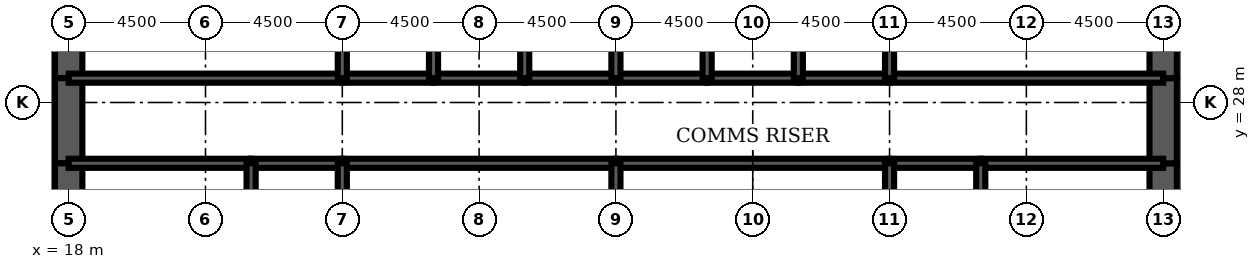
"""IFC4 building model, lengths in metres.
Left out: names, types, materials, properties, quantities, classifications, styles, units other than length and angle.
Written with IfcOpenShell. Run it as: python <this file> out.ifc"""

import sys

from ifc_helpers import new_model, si_unit, direction, frame, frame_2d, origin, place, context, subcontext, project, spatial, rectangle, extrude, element, fill, save


model = new_model("IFC4")
c1 = context("Model", 3, precision=1e-05, world=origin(), true_north=direction((0.0, 1.0)))
c2 = subcontext(c1, "Body", "Model", "MODEL_VIEW")
j1 = project(units=[si_unit("LENGTHUNIT", "METRE"), si_unit("PLANEANGLEUNIT", "RADIAN")], contexts=[c1])
p1 = place(None, origin())
s1 = spatial("IfcSite", under=j1, at=p1, CompositionType="ELEMENT")
p2 = place(p1, origin())
s2 = spatial("IfcBuilding", under=s1, at=p2, CompositionType="ELEMENT")
p3 = place(p2, frame((0.0, 0.0, 163.5)))
s3 = spatial("IfcBuildingStorey", under=s2, at=p3, CompositionType="ELEMENT", Elevation=163.5)
p4 = place(p3, frame((18.0, 32.0, 0.0), z_axis=(0.0, 0.0, 1.0), x_axis=(0.0, -1.0, 0.0)))
e1 = element("IfcWall", 1, at=p4, inside=s3, PredefinedType="SHEAR", context=c2, shape_type="SweptSolid", body=[
    extrude(rectangle(XDim=3.2, YDim=0.9, at=frame_2d((1.6, 0.0))), origin(), (0.0, 0.0, 1.0), 4.2),
])
p5 = place(p3, frame((18.0, 28.8, 0.0), z_axis=(0.0, 0.0, 1.0), x_axis=(0.0, -1.0, 0.0)))
e2 = element("IfcWall", 2, at=p5, inside=s3, PredefinedType="SHEAR", context=c2, shape_type="SweptSolid", body=[
    extrude(rectangle(XDim=2.8, YDim=0.9, at=frame_2d((1.4, 0.0))), origin(), (0.0, 0.0, 1.0), 4.2),
])
p6 = place(p5, frame((0.4, 0.0, 0.0)))
e3 = element("IfcOpeningElement", 3, at=p6, cuts=e2, PredefinedType="OPENING", context=c2, shape_type="SweptSolid", body=[
    extrude(rectangle(XDim=1.8, YDim=2.1, at=frame_2d((0.9, 1.05))), frame((0.0, 0.46, 0.0), z_axis=(0.0, -1.0, 0.0), x_axis=(1.0, 0.0, 0.0)), (0.0, 0.0, 1.0), 0.92),
])
for number, where, z_axis, x_axis in (
    (4, (18.0, 26.0, 0.0), (0.0, 0.0, 1.0), (0.0, -1.0, 0.0)),
    (5, (54.0, 22.0, 0.0), (0.0, 0.0, 1.0), (0.0, 1.0, 0.0)),
):
    element("IfcWall", number, at=place(p3, frame(where, z_axis=z_axis, x_axis=x_axis)), inside=s3, PredefinedType="SHEAR", context=c2, shape_type="SweptSolid", body=[
        extrude(rectangle(XDim=4.0, YDim=0.9, at=frame_2d((2.0, 0.0))), origin(), (0.0, 0.0, 1.0), 4.2),
    ])
p7 = place(p3, frame((54.0, 26.0, 0.0), z_axis=(0.0, 0.0, 1.0), x_axis=(0.0, 1.0, 0.0)))
e6 = element("IfcWall", 6, at=p7, inside=s3, PredefinedType="SHEAR", context=c2, shape_type="SweptSolid", body=[
    extrude(rectangle(XDim=2.8, YDim=0.9, at=frame_2d((1.4, 0.0))), origin(), (0.0, 0.0, 1.0), 4.2),
])
p8 = place(p7, frame((0.6, 0.0, 0.0)))
e7 = element("IfcOpeningElement", 7, at=p8, cuts=e6, PredefinedType="OPENING", context=c2, shape_type="SweptSolid", body=[
    extrude(rectangle(XDim=1.8, YDim=2.1, at=frame_2d((0.9, 1.05))), frame((0.0, 0.46, 0.0), z_axis=(0.0, -1.0, 0.0), x_axis=(1.0, 0.0, 0.0)), (0.0, 0.0, 1.0), 0.92),
])
p9 = place(p3, frame((54.0, 28.8, 0.0), z_axis=(0.0, 0.0, 1.0), x_axis=(0.0, 1.0, 0.0)))
e8 = element("IfcWall", 8, at=p9, inside=s3, PredefinedType="SHEAR", context=c2, shape_type="SweptSolid", body=[
    extrude(rectangle(XDim=3.2, YDim=0.9, at=frame_2d((1.6, 0.0))), origin(), (0.0, 0.0, 1.0), 4.2),
])
p10 = place(p3, frame((18.0, 28.8, 0.0), z_axis=(0.0, 0.0, 1.0), x_axis=(1.0, 0.0, 0.0)))
e9 = element("IfcWall", 9, at=p10, inside=s3, PredefinedType="SOLIDWALL", context=c2, shape_type="SweptSolid", body=[
    extrude(rectangle(XDim=9.0, YDim=0.3, at=frame_2d((4.5, 0.0))), origin(), (0.0, 0.0, 1.0), 4.2),
])
p11 = place(p10, frame((0.65, 0.0, 0.0)))
e10 = element("IfcOpeningElement", 10, at=p11, cuts=e9, PredefinedType="OPENING", context=c2, shape_type="SweptSolid", body=[
    extrude(rectangle(XDim=1.0, YDim=2.1, at=frame_2d((0.5, 1.05))), frame((0.0, 0.16, 0.0), z_axis=(0.0, -1.0, 0.0), x_axis=(1.0, 0.0, 0.0)), (0.0, 0.0, 1.0), 0.32),
])
p12 = place(p3, frame((27.0, 28.8, 0.0), z_axis=(0.0, 0.0, 1.0), x_axis=(1.0, 0.0, 0.0)))
e11 = element("IfcWall", 11, at=p12, inside=s3, PredefinedType="SOLIDWALL", context=c2, shape_type="SweptSolid", body=[
    extrude(rectangle(XDim=3.0, YDim=0.3, at=frame_2d((1.5, 0.0))), origin(), (0.0, 0.0, 1.0), 4.2),
])
p13 = place(p12, frame((0.95, 0.0, 0.0)))
e12 = element("IfcOpeningElement", 12, at=p13, cuts=e11, PredefinedType="OPENING", context=c2, shape_type="SweptSolid", body=[
    extrude(rectangle(XDim=1.1, YDim=2.2, at=frame_2d((0.55, 1.1))), frame((0.0, 0.16, 0.0), z_axis=(0.0, -1.0, 0.0), x_axis=(1.0, 0.0, 0.0)), (0.0, 0.0, 1.0), 0.32),
])
p14 = place(p3, frame((30.0, 28.8, 0.0), z_axis=(0.0, 0.0, 1.0), x_axis=(1.0, 0.0, 0.0)))
e13 = element("IfcWall", 13, at=p14, inside=s3, PredefinedType="SOLIDWALL", context=c2, shape_type="SweptSolid", body=[
    extrude(rectangle(XDim=3.0, YDim=0.3, at=frame_2d((1.5, 0.0))), origin(), (0.0, 0.0, 1.0), 4.2),
])
p15 = place(p14, frame((0.95, 0.0, 0.0)))
e14 = element("IfcOpeningElement", 14, at=p15, cuts=e13, PredefinedType="OPENING", context=c2, shape_type="SweptSolid", body=[
    extrude(rectangle(XDim=1.1, YDim=2.2, at=frame_2d((0.55, 1.1))), frame((0.0, 0.16, 0.0), z_axis=(0.0, -1.0, 0.0), x_axis=(1.0, 0.0, 0.0)), (0.0, 0.0, 1.0), 0.32),
])
p16 = place(p3, frame((33.0, 28.8, 0.0), z_axis=(0.0, 0.0, 1.0), x_axis=(1.0, 0.0, 0.0)))
e15 = element("IfcWall", 15, at=p16, inside=s3, PredefinedType="SOLIDWALL", context=c2, shape_type="SweptSolid", body=[
    extrude(rectangle(XDim=3.0, YDim=0.3, at=frame_2d((1.5, 0.0))), origin(), (0.0, 0.0, 1.0), 4.2),
])
p17 = place(p16, frame((0.95, 0.0, 0.0)))
e16 = element("IfcOpeningElement", 16, at=p17, cuts=e15, PredefinedType="OPENING", context=c2, shape_type="SweptSolid", body=[
    extrude(rectangle(XDim=1.1, YDim=2.2, at=frame_2d((0.55, 1.1))), frame((0.0, 0.16, 0.0), z_axis=(0.0, -1.0, 0.0), x_axis=(1.0, 0.0, 0.0)), (0.0, 0.0, 1.0), 0.32),
])
for number, where, z_axis, x_axis in (
    (17, (36.0, 28.8, 0.0), (0.0, 0.0, 1.0), (1.0, 0.0, 0.0)),
    (18, (39.0, 28.8, 0.0), (0.0, 0.0, 1.0), (1.0, 0.0, 0.0)),
):
    element("IfcWall", number, at=place(p3, frame(where, z_axis=z_axis, x_axis=x_axis)), inside=s3, PredefinedType="SOLIDWALL", context=c2, shape_type="SweptSolid", body=[
        extrude(rectangle(XDim=3.0, YDim=0.3, at=frame_2d((1.5, 0.0))), origin(), (0.0, 0.0, 1.0), 4.2),
    ])
p18 = place(p3, frame((42.0, 28.8, 0.0), z_axis=(0.0, 0.0, 1.0), x_axis=(1.0, 0.0, 0.0)))
e19 = element("IfcWall", 19, at=p18, inside=s3, PredefinedType="SOLIDWALL", context=c2, shape_type="SweptSolid", body=[
    extrude(rectangle(XDim=3.0, YDim=0.3, at=frame_2d((1.5, 0.0))), origin(), (0.0, 0.0, 1.0), 4.2),
])
p19 = place(p18, frame((0.95, 0.0, 0.0)))
e20 = element("IfcOpeningElement", 20, at=p19, cuts=e19, PredefinedType="OPENING", context=c2, shape_type="SweptSolid", body=[
    extrude(rectangle(XDim=1.1, YDim=2.2, at=frame_2d((0.55, 1.1))), frame((0.0, 0.16, 0.0), z_axis=(0.0, -1.0, 0.0), x_axis=(1.0, 0.0, 0.0)), (0.0, 0.0, 1.0), 0.32),
])
p20 = place(p3, frame((45.0, 28.8, 0.0), z_axis=(0.0, 0.0, 1.0), x_axis=(1.0, 0.0, 0.0)))
e21 = element("IfcWall", 21, at=p20, inside=s3, PredefinedType="SOLIDWALL", context=c2, shape_type="SweptSolid", body=[
    extrude(rectangle(XDim=9.0, YDim=0.3, at=frame_2d((4.5, 0.0))), origin(), (0.0, 0.0, 1.0), 4.2),
])
p21 = place(p20, frame((7.35, 0.0, 0.0)))
e22 = element("IfcOpeningElement", 22, at=p21, cuts=e21, PredefinedType="OPENING", context=c2, shape_type="SweptSolid", body=[
    extrude(rectangle(XDim=1.0, YDim=2.1, at=frame_2d((0.5, 1.05))), frame((0.0, 0.16, 0.0), z_axis=(0.0, -1.0, 0.0), x_axis=(1.0, 0.0, 0.0)), (0.0, 0.0, 1.0), 0.32),
])
p22 = place(p3, frame((18.0, 26.0, 0.0), z_axis=(0.0, 0.0, 1.0), x_axis=(1.0, 0.0, 0.0)))
e23 = element("IfcWall", 23, at=p22, inside=s3, PredefinedType="SOLIDWALL", context=c2, shape_type="SweptSolid", body=[
    extrude(rectangle(XDim=6.0, YDim=0.3, at=frame_2d((3.0, 0.0))), origin(), (0.0, 0.0, 1.0), 4.2),
])
p23 = place(p3, frame((24.0, 26.0, 0.0), z_axis=(0.0, 0.0, 1.0), x_axis=(1.0, 0.0, 0.0)))
e24 = element("IfcWall", 24, at=p23, inside=s3, PredefinedType="SOLIDWALL", context=c2, shape_type="SweptSolid", body=[
    extrude(rectangle(XDim=3.0, YDim=0.3, at=frame_2d((1.5, 0.0))), origin(), (0.0, 0.0, 1.0), 4.2),
])
for number, where, z_axis, x_axis in (
    (25, (27.0, 26.0, 0.0), (0.0, 0.0, 1.0), (1.0, 0.0, 0.0)),
    (26, (36.0, 26.0, 0.0), (0.0, 0.0, 1.0), (1.0, 0.0, 0.0)),
):
    element("IfcWall", number, at=place(p3, frame(where, z_axis=z_axis, x_axis=x_axis)), inside=s3, PredefinedType="SOLIDWALL", context=c2, shape_type="SweptSolid", body=[
        extrude(rectangle(XDim=9.0, YDim=0.3, at=frame_2d((4.5, 0.0))), origin(), (0.0, 0.0, 1.0), 4.2),
    ])
p24 = place(p3, frame((45.0, 26.0, 0.0), z_axis=(0.0, 0.0, 1.0), x_axis=(1.0, 0.0, 0.0)))
e27 = element("IfcWall", 27, at=p24, inside=s3, PredefinedType="SOLIDWALL", context=c2, shape_type="SweptSolid", body=[
    extrude(rectangle(XDim=3.0, YDim=0.3, at=frame_2d((1.5, 0.0))), origin(), (0.0, 0.0, 1.0), 4.2),
])
p25 = place(p3, frame((48.0, 26.0, 0.0), z_axis=(0.0, 0.0, 1.0), x_axis=(1.0, 0.0, 0.0)))
e28 = element("IfcWall", 28, at=p25, inside=s3, PredefinedType="SOLIDWALL", context=c2, shape_type="SweptSolid", body=[
    extrude(rectangle(XDim=6.0, YDim=0.3, at=frame_2d((3.0, 0.0))), origin(), (0.0, 0.0, 1.0), 4.2),
])
for number, where, z_axis, x_axis in (
    (29, (27.0, 28.8, 0.0), (0.0, 0.0, 1.0), (0.0, 1.0, 0.0)),
    (30, (30.0, 28.8, 0.0), (0.0, 0.0, 1.0), (0.0, 1.0, 0.0)),
    (31, (33.0, 28.8, 0.0), (0.0, 0.0, 1.0), (0.0, 1.0, 0.0)),
    (32, (36.0, 28.8, 0.0), (0.0, 0.0, 1.0), (0.0, 1.0, 0.0)),
    (33, (39.0, 28.8, 0.0), (0.0, 0.0, 1.0), (0.0, 1.0, 0.0)),
    (34, (42.0, 28.8, 0.0), (0.0, 0.0, 1.0), (0.0, 1.0, 0.0)),
    (35, (45.0, 28.8, 0.0), (0.0, 0.0, 1.0), (0.0, 1.0, 0.0)),
):
    element("IfcWall", number, at=place(p3, frame(where, z_axis=z_axis, x_axis=x_axis)), inside=s3, PredefinedType="SOLIDWALL", context=c2, shape_type="SweptSolid", body=[
        extrude(rectangle(XDim=3.2, YDim=0.3, at=frame_2d((1.6, 0.0))), origin(), (0.0, 0.0, 1.0), 4.2),
    ])
for number, where, z_axis, x_axis in (
    (36, (24.0, 22.0, 0.0), (0.0, 0.0, 1.0), (0.0, 1.0, 0.0)),
    (37, (27.0, 22.0, 0.0), (0.0, 0.0, 1.0), (0.0, 1.0, 0.0)),
    (38, (36.0, 22.0, 0.0), (0.0, 0.0, 1.0), (0.0, 1.0, 0.0)),
    (39, (45.0, 22.0, 0.0), (0.0, 0.0, 1.0), (0.0, 1.0, 0.0)),
    (40, (48.0, 22.0, 0.0), (0.0, 0.0, 1.0), (0.0, 1.0, 0.0)),
):
    element("IfcWall", number, at=place(p3, frame(where, z_axis=z_axis, x_axis=x_axis)), inside=s3, PredefinedType="SOLIDWALL", context=c2, shape_type="SweptSolid", body=[
        extrude(rectangle(XDim=4.0, YDim=0.3, at=frame_2d((2.0, 0.0))), origin(), (0.0, 0.0, 1.0), 4.2),
    ])
p26 = place(p3, frame((39.0, 22.15, 0.0), z_axis=(0.0, 0.0, 1.0), x_axis=(0.0, 1.0, 0.0)))
e41 = element("IfcWall", 41, at=p26, inside=s3, PredefinedType="PARTITIONING", context=c2, shape_type="SweptSolid", body=[
    extrude(rectangle(XDim=3.7, YDim=0.15, at=frame_2d((1.85, 0.0))), origin(), (0.0, 0.0, 1.0), 3.0),
])
p27 = place(p26, frame((2.2, 0.0, 0.0)))
e42 = element("IfcOpeningElement", 42, at=p27, cuts=e41, PredefinedType="OPENING", context=c2, shape_type="SweptSolid", body=[
    extrude(rectangle(XDim=1.0, YDim=2.1, at=frame_2d((0.5, 1.05))), frame((0.0, 0.085, 0.0), z_axis=(0.0, -1.0, 0.0), x_axis=(1.0, 0.0, 0.0)), (0.0, 0.0, 1.0), 0.17),
])
for number, where, z_axis, x_axis in (
    (43, (20.325, 22.15, 0.0), (0.0, 0.0, 1.0), (0.0, 1.0, 0.0)),
    (44, (51.975, 22.15, 0.0), (0.0, 0.0, 1.0), (0.0, 1.0, 0.0)),
):
    element("IfcWall", number, at=place(p3, frame(where, z_axis=z_axis, x_axis=x_axis)), inside=s3, PredefinedType="PARTITIONING", context=c2, shape_type="SweptSolid", body=[
        extrude(rectangle(XDim=3.7, YDim=0.15, at=frame_2d((1.85, 0.0))), origin(), (0.0, 0.0, 1.0), 3.0),
    ])
p28 = place(p27, origin())
e45 = element("IfcDoor", 45, at=p28, inside=s3, OperationType="SINGLE_SWING_RIGHT", PredefinedType="DOOR", context=c2, shape_type="SweptSolid", body=[
    extrude(rectangle(XDim=1.0, YDim=2.1, at=frame_2d((0.5, 1.05))), frame((0.0, 0.025, 0.0), z_axis=(0.0, -1.0, 0.0), x_axis=(1.0, 0.0, 0.0)), (0.0, 0.0, 1.0), 0.05),
])
fill(e42, e45)
p29 = place(p19, origin())
e46 = element("IfcDoor", 46, at=p29, inside=s3, OperationType="DOUBLE_DOOR_SLIDING", PredefinedType="USERDEFINED", context=c2, shape_type="SweptSolid", body=[
    extrude(rectangle(XDim=1.1, YDim=2.2, at=frame_2d((0.55, 1.1))), frame((0.0, 0.025, 0.0), z_axis=(0.0, -1.0, 0.0), x_axis=(1.0, 0.0, 0.0)), (0.0, 0.0, 1.0), 0.05),
])
fill(e20, e46)
p30 = place(p13, origin())
e47 = element("IfcDoor", 47, at=p30, inside=s3, OperationType="DOUBLE_DOOR_SLIDING", PredefinedType="USERDEFINED", context=c2, shape_type="SweptSolid", body=[
    extrude(rectangle(XDim=1.1, YDim=2.2, at=frame_2d((0.55, 1.1))), frame((0.0, 0.025, 0.0), z_axis=(0.0, -1.0, 0.0), x_axis=(1.0, 0.0, 0.0)), (0.0, 0.0, 1.0), 0.05),
])
fill(e12, e47)
p31 = place(p15, origin())
e48 = element("IfcDoor", 48, at=p31, inside=s3, OperationType="DOUBLE_DOOR_SLIDING", PredefinedType="USERDEFINED", context=c2, shape_type="SweptSolid", body=[
    extrude(rectangle(XDim=1.1, YDim=2.2, at=frame_2d((0.55, 1.1))), frame((0.0, 0.025, 0.0), z_axis=(0.0, -1.0, 0.0), x_axis=(1.0, 0.0, 0.0)), (0.0, 0.0, 1.0), 0.05),
])
fill(e14, e48)
p32 = place(p17, origin())
e49 = element("IfcDoor", 49, at=p32, inside=s3, OperationType="DOUBLE_DOOR_SLIDING", PredefinedType="USERDEFINED", context=c2, shape_type="SweptSolid", body=[
    extrude(rectangle(XDim=1.1, YDim=2.2, at=frame_2d((0.55, 1.1))), frame((0.0, 0.025, 0.0), z_axis=(0.0, -1.0, 0.0), x_axis=(1.0, 0.0, 0.0)), (0.0, 0.0, 1.0), 0.05),
])
fill(e16, e49)
p33 = place(p11, origin())
e50 = element("IfcDoor", 50, at=p33, inside=s3, OperationType="SINGLE_SWING_LEFT", PredefinedType="DOOR", context=c2, shape_type="SweptSolid", body=[
    extrude(rectangle(XDim=1.0, YDim=2.1, at=frame_2d((0.5, 1.05))), frame((0.0, 0.025, 0.0), z_axis=(0.0, -1.0, 0.0), x_axis=(1.0, 0.0, 0.0)), (0.0, 0.0, 1.0), 0.05),
])
fill(e10, e50)
p34 = place(p21, origin())
e51 = element("IfcDoor", 51, at=p34, inside=s3, OperationType="SINGLE_SWING_RIGHT", PredefinedType="DOOR", context=c2, shape_type="SweptSolid", body=[
    extrude(rectangle(XDim=1.0, YDim=2.1, at=frame_2d((0.5, 1.05))), frame((0.0, 0.025, 0.0), z_axis=(0.0, -1.0, 0.0), x_axis=(1.0, 0.0, 0.0)), (0.0, 0.0, 1.0), 0.05),
])
fill(e22, e51)
p35 = place(p6, origin())
e52 = element("IfcDoor", 52, at=p35, inside=s3, OperationType="SINGLE_SWING_LEFT", PredefinedType="DOOR", context=c2, shape_type="SweptSolid", body=[
    extrude(rectangle(XDim=1.8, YDim=2.1, at=frame_2d((0.9, 1.05))), frame((0.0, 0.45, 0.0), z_axis=(0.0, -1.0, 0.0), x_axis=(1.0, 0.0, 0.0)), (0.0, 0.0, 1.0), 0.899),
])
fill(e3, e52)
p36 = place(p8, origin())
e53 = element("IfcDoor", 53, at=p36, inside=s3, OperationType="SINGLE_SWING_LEFT", PredefinedType="DOOR", context=c2, shape_type="SweptSolid", body=[
    extrude(rectangle(XDim=1.8, YDim=2.1, at=frame_2d((0.9, 1.05))), frame((0.0, 0.45, 0.0), z_axis=(0.0, -1.0, 0.0), x_axis=(1.0, 0.0, 0.0)), (0.0, 0.0, 1.0), 0.899),
])
fill(e7, e53)
save(model, sys.argv[1])
